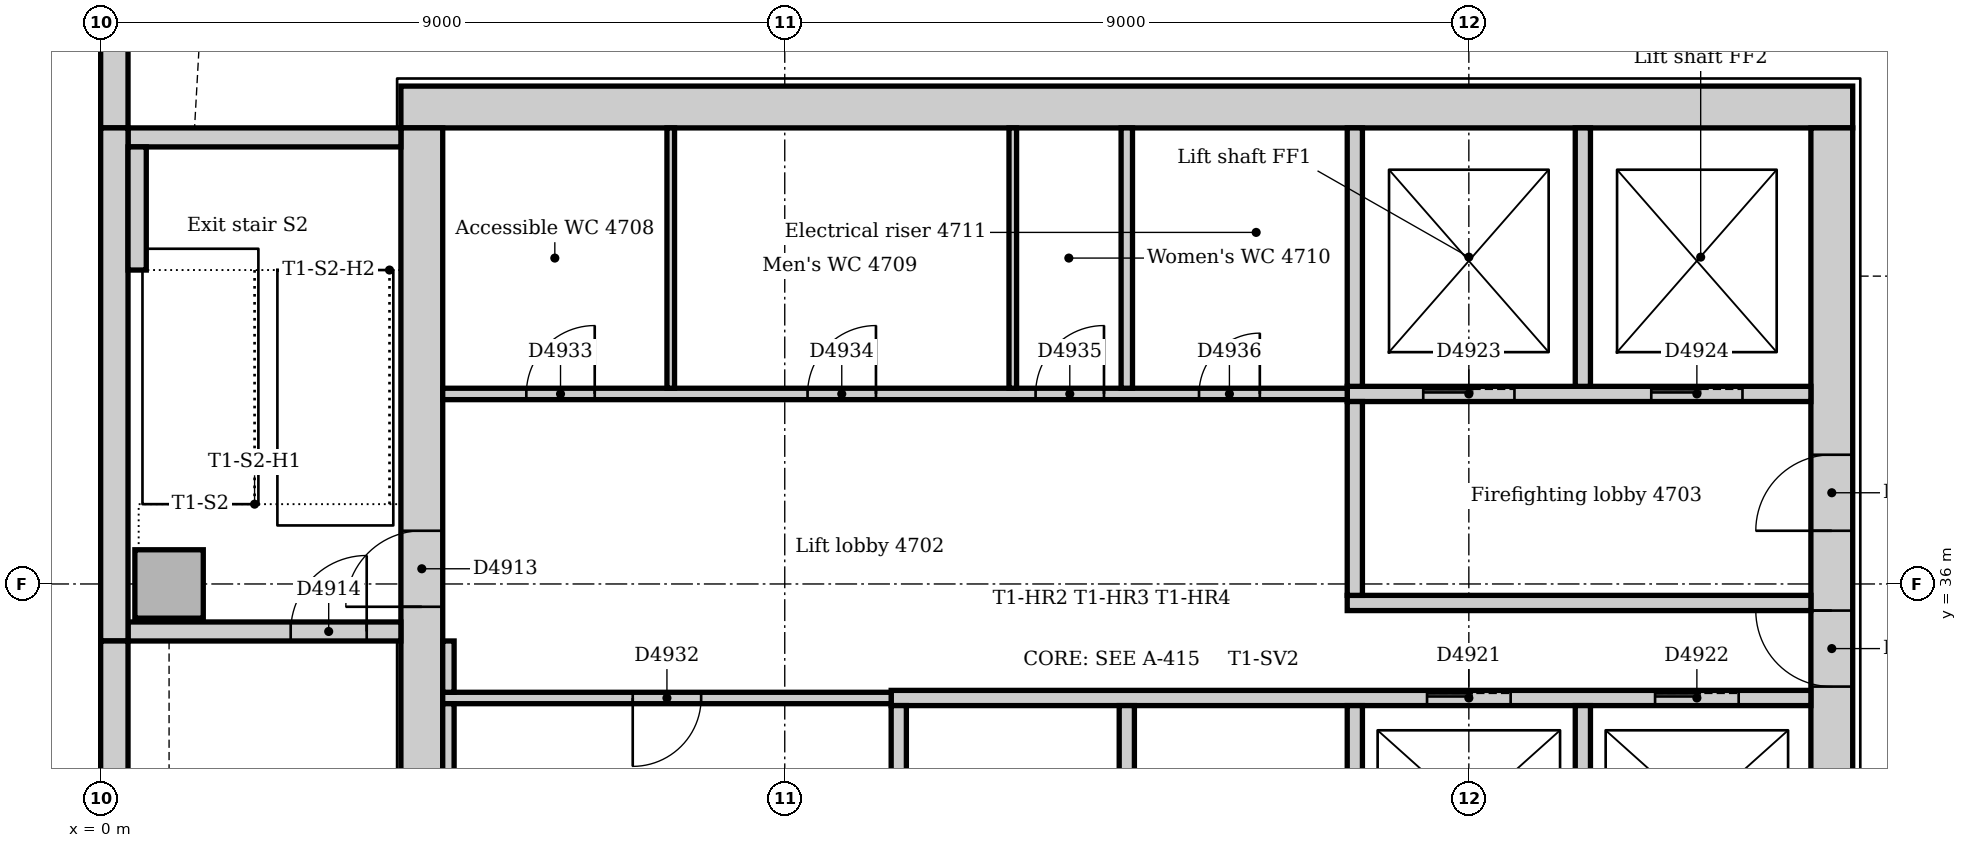
"""IFC4 building model, lengths in metres.
Left out: names, types, materials, properties, quantities, classifications, styles, units other than length and angle.
Written with IfcOpenShell. Run it as: python <this file> out.ifc"""

import sys

from ifc_helpers import new_model, si_unit, direction, frame, frame_2d, origin, origin_2d, place, context, subcontext, project, spatial, rectangle, extrude, element, fill, save


model = new_model("IFC4")
c1 = context("Model", 3, precision=1e-05, world=origin(), true_north=direction((0.0, 1.0)))
c2 = subcontext(c1, "Body", "Model", "MODEL_VIEW")
j1 = project(units=[si_unit("LENGTHUNIT", "METRE"), si_unit("PLANEANGLEUNIT", "RADIAN")], contexts=[c1])
p1 = place(None, origin())
s1 = spatial("IfcSite", under=j1, at=p1, CompositionType="ELEMENT")
p2 = place(p1, origin())
s2 = spatial("IfcBuilding", under=s1, at=p2, CompositionType="ELEMENT")
p3 = place(p2, frame((0.0, 0.0, 198.0)))
s3 = spatial("IfcBuildingStorey", under=s2, at=p3, CompositionType="ELEMENT", Elevation=198.0)
p4 = place(p3, frame((23.05, 42.275, 0.0), z_axis=(0.0, 0.0, 1.0), x_axis=(-1.0, 0.0, 0.0)))
e1 = element("IfcWall", 1, at=p4, inside=s3, PredefinedType="SOLIDWALL", context=c2, shape_type="SweptSolid", body=[
    extrude(rectangle(XDim=19.1, YDim=0.55, at=frame_2d((9.55, 0.0))), origin(), (0.0, 0.0, 1.0), 4.0),
])
p5 = place(p3, frame((22.775, 31.5, 0.0), z_axis=(0.0, 0.0, 1.0), x_axis=(0.0, 1.0, 0.0)))
e2 = element("IfcWall", 2, at=p5, inside=s3, PredefinedType="SOLIDWALL", context=c2, shape_type="SweptSolid", body=[
    extrude(rectangle(XDim=10.5, YDim=0.55, at=frame_2d((5.25, 0.0))), origin(), (0.0, 0.0, 1.0), 4.0),
])
p6 = place(p5, frame((3.15, 0.0, 0.0)))
e3 = element("IfcOpeningElement", 3, at=p6, cuts=e2, PredefinedType="OPENING", context=c2, shape_type="SweptSolid", body=[
    extrude(rectangle(XDim=1.0, YDim=2.1, at=frame_2d((0.5, 1.05))), frame((0.0, 0.285, 0.0), z_axis=(0.0, -1.0, 0.0), x_axis=(1.0, 0.0, 0.0)), (0.0, 0.0, 1.0), 0.57),
])
p7 = place(p5, frame((5.2, 0.0, 0.0)))
e4 = element("IfcOpeningElement", 4, at=p7, cuts=e2, PredefinedType="OPENING", context=c2, shape_type="SweptSolid", body=[
    extrude(rectangle(XDim=1.0, YDim=2.1, at=frame_2d((0.5, 1.05))), frame((0.0, 0.285, 0.0), z_axis=(0.0, -1.0, 0.0), x_axis=(1.0, 0.0, 0.0)), (0.0, 0.0, 1.0), 0.57),
])
p8 = place(p3, frame((4.225, 42.0, 0.0), z_axis=(0.0, 0.0, 1.0), x_axis=(0.0, -1.0, 0.0)))
e5 = element("IfcWall", 5, at=p8, inside=s3, PredefinedType="SOLIDWALL", context=c2, shape_type="SweptSolid", body=[
    extrude(rectangle(XDim=10.5, YDim=0.55, at=frame_2d((5.25, 0.0))), origin(), (0.0, 0.0, 1.0), 4.0),
])
p9 = place(p8, frame((5.3, 0.0, 0.0)))
e6 = element("IfcOpeningElement", 6, at=p9, cuts=e5, PredefinedType="OPENING", context=c2, shape_type="SweptSolid", body=[
    extrude(rectangle(XDim=1.0, YDim=2.1, at=frame_2d((0.5, 1.05))), frame((0.0, 0.285, 0.0), z_axis=(0.0, -1.0, 0.0), x_axis=(1.0, 0.0, 0.0)), (0.0, 0.0, 1.0), 0.57),
])
p10 = place(p3, frame((0.36, 35.375, 0.0), z_axis=(0.0, 0.0, 1.0), x_axis=(1.0, 0.0, 0.0)))
e7 = element("IfcWall", 7, at=p10, inside=s3, PredefinedType="SOLIDWALL", context=c2, shape_type="SweptSolid", body=[
    extrude(rectangle(XDim=3.59, YDim=0.25, at=frame_2d((1.795, 0.0))), origin(), (0.0, 0.0, 1.0), 4.0),
])
p11 = place(p10, frame((2.14, 0.0, 0.0)))
e8 = element("IfcOpeningElement", 8, at=p11, cuts=e7, PredefinedType="OPENING", context=c2, shape_type="SweptSolid", body=[
    extrude(rectangle(XDim=1.0, YDim=2.1, at=frame_2d((0.5, 1.05))), frame((0.0, 0.135, 0.0), z_axis=(0.0, -1.0, 0.0), x_axis=(1.0, 0.0, 0.0)), (0.0, 0.0, 1.0), 0.27),
])
p12 = place(p3, frame((3.95, 41.875, 0.0), z_axis=(0.0, 0.0, 1.0), x_axis=(-1.0, 0.0, 0.0)))
e9 = element("IfcWall", 9, at=p12, inside=s3, PredefinedType="SOLIDWALL", context=c2, shape_type="SweptSolid", body=[
    extrude(rectangle(XDim=3.59, YDim=0.25, at=frame_2d((1.795, 0.0))), origin(), (0.0, 0.0, 1.0), 4.0),
])
p13 = place(p3, frame((0.9, 36.0, 0.0), z_axis=(0.0, 0.0, 1.0), x_axis=(1.0, 0.0, 0.0)))
e10 = element("IfcColumn", 10, at=p13, inside=s3, PredefinedType="COLUMN", context=c2, shape_type="SweptSolid", body=[
    extrude(rectangle(XDim=0.9, YDim=0.9, at=origin_2d()), origin(), (0.0, 0.0, 1.0), 4.0),
])
p14 = place(p3, frame((0.18, 54.257, 0.0), z_axis=(0.0, 0.0, 1.0), x_axis=(0.0, -1.0, 0.0)))
e11 = element("IfcWall", 11, at=p14, inside=s3, PredefinedType="STANDARD", context=c2, shape_type="SweptSolid", body=[
    extrude(rectangle(XDim=12.257, YDim=0.36, at=frame_2d((6.129, 0.0))), origin(), (0.0, 0.0, 1.0), 3.85),
])
p15 = place(p14, frame((3.107, 0.0, 0.9)))
e12 = element("IfcOpeningElement", 12, at=p15, cuts=e11, PredefinedType="OPENING", context=c2, shape_type="SweptSolid", body=[
    extrude(rectangle(XDim=3.3, YDim=1.6, at=frame_2d((1.65, 0.8))), frame((0.0, 0.19, 0.0), z_axis=(0.0, -1.0, 0.0), x_axis=(1.0, 0.0, 0.0)), (0.0, 0.0, 1.0), 0.38),
])
p16 = place(p14, frame((7.607, 0.0, 0.9)))
e13 = element("IfcOpeningElement", 13, at=p16, cuts=e11, PredefinedType="OPENING", context=c2, shape_type="SweptSolid", body=[
    extrude(rectangle(XDim=3.3, YDim=1.6, at=frame_2d((1.65, 0.8))), frame((0.0, 0.19, 0.0), z_axis=(0.0, -1.0, 0.0), x_axis=(1.0, 0.0, 0.0)), (0.0, 0.0, 1.0), 0.38),
])
p17 = place(p3, frame((0.18, 42.0, 0.0), z_axis=(0.0, 0.0, 1.0), x_axis=(0.0, -1.0, 0.0)))
e14 = element("IfcWall", 14, at=p17, inside=s3, PredefinedType="STANDARD", context=c2, shape_type="SweptSolid", body=[
    extrude(rectangle(XDim=6.75, YDim=0.36, at=frame_2d((3.375, 0.0))), origin(), (0.0, 0.0, 1.0), 3.85),
])
p18 = place(p3, frame((0.18, 35.25, 0.0), z_axis=(0.0, 0.0, 1.0), x_axis=(0.0, -1.0, 0.0)))
e15 = element("IfcWall", 15, at=p18, inside=s3, PredefinedType="STANDARD", context=c2, shape_type="SweptSolid", body=[
    extrude(rectangle(XDim=7.5, YDim=0.36, at=frame_2d((3.75, 0.0))), origin(), (0.0, 0.0, 1.0), 3.85),
])
p19 = place(p3, frame((0.48, 40.13, 0.0), z_axis=(0.0, 0.0, 1.0), x_axis=(0.0, 1.0, 0.0)))
e16 = element("IfcWall", 16, at=p19, inside=s3, PredefinedType="STANDARD", context=c2, shape_type="SweptSolid", body=[
    extrude(rectangle(XDim=1.62, YDim=0.24, at=frame_2d((0.81, 0.0))), origin(), (0.0, 0.0, 1.0), 4.0),
])
p20 = place(p3, frame((16.4, 35.75, 0.0), z_axis=(0.0, 0.0, 1.0), x_axis=(1.0, 0.0, 0.0)))
e17 = element("IfcWall", 17, at=p20, inside=s3, PredefinedType="PARTITIONING", context=c2, shape_type="SweptSolid", body=[
    extrude(rectangle(XDim=6.1, YDim=0.2, at=frame_2d((3.05, 0.0))), origin(), (0.0, 0.0, 1.0), 3.85),
])
p21 = place(p3, frame((16.4, 38.5, 0.0), z_axis=(0.0, 0.0, 1.0), x_axis=(1.0, 0.0, 0.0)))
e18 = element("IfcWall", 18, at=p21, inside=s3, PredefinedType="PARTITIONING", context=c2, shape_type="SweptSolid", body=[
    extrude(rectangle(XDim=6.1, YDim=0.2, at=frame_2d((3.05, 0.0))), origin(), (0.0, 0.0, 1.0), 3.85),
])
p22 = place(p21, frame((1.0, 0.0, 0.0)))
e19 = element("IfcOpeningElement", 19, at=p22, cuts=e18, PredefinedType="OPENING", context=c2, shape_type="SweptSolid", body=[
    extrude(rectangle(XDim=1.2, YDim=2.1, at=frame_2d((0.6, 1.05))), frame((0.0, 0.11, 0.0), z_axis=(0.0, -1.0, 0.0), x_axis=(1.0, 0.0, 0.0)), (0.0, 0.0, 1.0), 0.22),
])
p23 = place(p21, frame((4.0, 0.0, 0.0)))
e20 = element("IfcOpeningElement", 20, at=p23, cuts=e18, PredefinedType="OPENING", context=c2, shape_type="SweptSolid", body=[
    extrude(rectangle(XDim=1.2, YDim=2.1, at=frame_2d((0.6, 1.05))), frame((0.0, 0.11, 0.0), z_axis=(0.0, -1.0, 0.0), x_axis=(1.0, 0.0, 0.0)), (0.0, 0.0, 1.0), 0.22),
])
p24 = place(p3, frame((16.5, 35.85, 0.0), z_axis=(0.0, 0.0, 1.0), x_axis=(0.0, 1.0, 0.0)))
e21 = element("IfcWall", 21, at=p24, inside=s3, PredefinedType="PARTITIONING", context=c2, shape_type="SweptSolid", body=[
    extrude(rectangle(XDim=2.55, YDim=0.2, at=frame_2d((1.275, 0.0))), origin(), (0.0, 0.0, 1.0), 3.85),
])
p25 = place(p3, frame((10.4, 34.5, 0.0), z_axis=(0.0, 0.0, 1.0), x_axis=(1.0, 0.0, 0.0)))
e22 = element("IfcWall", 22, at=p25, inside=s3, PredefinedType="PARTITIONING", context=c2, shape_type="SweptSolid", body=[
    extrude(rectangle(XDim=12.1, YDim=0.2, at=frame_2d((6.05, 0.0))), origin(), (0.0, 0.0, 1.0), 3.85),
])
p26 = place(p25, frame((7.05, 0.0, 0.0)))
e23 = element("IfcOpeningElement", 23, at=p26, cuts=e22, PredefinedType="OPENING", context=c2, shape_type="SweptSolid", body=[
    extrude(rectangle(XDim=1.1, YDim=2.1, at=frame_2d((0.55, 1.05))), frame((0.0, 0.11, 0.0), z_axis=(0.0, -1.0, 0.0), x_axis=(1.0, 0.0, 0.0)), (0.0, 0.0, 1.0), 0.22),
])
p27 = place(p25, frame((10.05, 0.0, 0.0)))
e24 = element("IfcOpeningElement", 24, at=p27, cuts=e22, PredefinedType="OPENING", context=c2, shape_type="SweptSolid", body=[
    extrude(rectangle(XDim=1.1, YDim=2.1, at=frame_2d((0.55, 1.05))), frame((0.0, 0.11, 0.0), z_axis=(0.0, -1.0, 0.0), x_axis=(1.0, 0.0, 0.0)), (0.0, 0.0, 1.0), 0.22),
])
for number, where, z_axis, x_axis in (
    (25, (10.5, 31.75, 0.0), (0.0, 0.0, 1.0), (0.0, 1.0, 0.0)),
    (26, (13.5, 31.75, 0.0), (0.0, 0.0, 1.0), (0.0, 1.0, 0.0)),
    (27, (16.5, 31.75, 0.0), (0.0, 0.0, 1.0), (0.0, 1.0, 0.0)),
    (28, (19.5, 31.75, 0.0), (0.0, 0.0, 1.0), (0.0, 1.0, 0.0)),
):
    element("IfcWall", number, at=place(p3, frame(where, z_axis=z_axis, x_axis=x_axis)), inside=s3, PredefinedType="PARTITIONING", context=c2, shape_type="SweptSolid", body=[
        extrude(rectangle(XDim=2.65, YDim=0.2, at=frame_2d((1.325, 0.0))), origin(), (0.0, 0.0, 1.0), 3.85),
    ])
for number, where, z_axis, x_axis in (
    (29, (16.5, 38.6, 0.0), (0.0, 0.0, 1.0), (0.0, 1.0, 0.0)),
    (30, (19.5, 38.6, 0.0), (0.0, 0.0, 1.0), (0.0, 1.0, 0.0)),
):
    element("IfcWall", number, at=place(p3, frame(where, z_axis=z_axis, x_axis=x_axis)), inside=s3, PredefinedType="PARTITIONING", context=c2, shape_type="SweptSolid", body=[
        extrude(rectangle(XDim=3.4, YDim=0.2, at=frame_2d((1.7, 0.0))), origin(), (0.0, 0.0, 1.0), 3.85),
    ])
p28 = place(p3, frame((4.5, 38.5, 0.0), z_axis=(0.0, 0.0, 1.0), x_axis=(1.0, 0.0, 0.0)))
e31 = element("IfcWall", 31, at=p28, inside=s3, PredefinedType="PARTITIONING", context=c2, shape_type="SweptSolid", body=[
    extrude(rectangle(XDim=11.9, YDim=0.15, at=frame_2d((5.95, 0.0))), origin(), (0.0, 0.0, 1.0), 3.85),
])
p29 = place(p28, frame((1.1, 0.0, 0.0)))
e32 = element("IfcOpeningElement", 32, at=p29, cuts=e31, PredefinedType="OPENING", context=c2, shape_type="SweptSolid", body=[
    extrude(rectangle(XDim=0.9, YDim=2.1, at=frame_2d((0.45, 1.05))), frame((0.0, 0.085, 0.0), z_axis=(0.0, -1.0, 0.0), x_axis=(1.0, 0.0, 0.0)), (0.0, 0.0, 1.0), 0.17),
])
p30 = place(p28, frame((4.8, 0.0, 0.0)))
e33 = element("IfcOpeningElement", 33, at=p30, cuts=e31, PredefinedType="OPENING", context=c2, shape_type="SweptSolid", body=[
    extrude(rectangle(XDim=0.9, YDim=2.1, at=frame_2d((0.45, 1.05))), frame((0.0, 0.085, 0.0), z_axis=(0.0, -1.0, 0.0), x_axis=(1.0, 0.0, 0.0)), (0.0, 0.0, 1.0), 0.17),
])
p31 = place(p28, frame((7.8, 0.0, 0.0)))
e34 = element("IfcOpeningElement", 34, at=p31, cuts=e31, PredefinedType="OPENING", context=c2, shape_type="SweptSolid", body=[
    extrude(rectangle(XDim=0.9, YDim=2.1, at=frame_2d((0.45, 1.05))), frame((0.0, 0.085, 0.0), z_axis=(0.0, -1.0, 0.0), x_axis=(1.0, 0.0, 0.0)), (0.0, 0.0, 1.0), 0.17),
])
p32 = place(p28, frame((9.95, 0.0, 0.0)))
e35 = element("IfcOpeningElement", 35, at=p32, cuts=e31, PredefinedType="OPENING", context=c2, shape_type="SweptSolid", body=[
    extrude(rectangle(XDim=0.8, YDim=2.1, at=frame_2d((0.4, 1.05))), frame((0.0, 0.085, 0.0), z_axis=(0.0, -1.0, 0.0), x_axis=(1.0, 0.0, 0.0)), (0.0, 0.0, 1.0), 0.17),
])
p33 = place(p3, frame((4.5, 34.5, 0.0), z_axis=(0.0, 0.0, 1.0), x_axis=(1.0, 0.0, 0.0)))
e36 = element("IfcWall", 36, at=p33, inside=s3, PredefinedType="PARTITIONING", context=c2, shape_type="SweptSolid", body=[
    extrude(rectangle(XDim=5.9, YDim=0.15, at=frame_2d((2.95, 0.0))), origin(), (0.0, 0.0, 1.0), 3.85),
])
p34 = place(p33, frame((2.5, 0.0, 0.0)))
e37 = element("IfcOpeningElement", 37, at=p34, cuts=e36, PredefinedType="OPENING", context=c2, shape_type="SweptSolid", body=[
    extrude(rectangle(XDim=0.9, YDim=2.1, at=frame_2d((0.45, 1.05))), frame((0.0, 0.085, 0.0), z_axis=(0.0, -1.0, 0.0), x_axis=(1.0, 0.0, 0.0)), (0.0, 0.0, 1.0), 0.17),
])
p35 = place(p3, frame((4.575, 34.575, 0.0), z_axis=(0.0, 0.0, 1.0), x_axis=(0.0, 1.0, 0.0)))
e38 = element("IfcWall", 38, at=p35, inside=s3, PredefinedType="PARTITIONING", context=c2, shape_type="SweptSolid", body=[
    extrude(rectangle(XDim=0.675, YDim=0.15, at=frame_2d((0.338, 0.0))), origin(), (0.0, 0.0, 1.0), 3.85),
])
p36 = place(p3, frame((4.575, 31.75, 0.0), z_axis=(0.0, 0.0, 1.0), x_axis=(0.0, 1.0, 0.0)))
e39 = element("IfcWall", 39, at=p36, inside=s3, PredefinedType="PARTITIONING", context=c2, shape_type="SweptSolid", body=[
    extrude(rectangle(XDim=2.675, YDim=0.15, at=frame_2d((1.337, 0.0))), origin(), (0.0, 0.0, 1.0), 3.85),
])
p37 = place(p3, frame((13.5, 38.575, 0.0), z_axis=(0.0, 0.0, 1.0), x_axis=(0.0, 1.0, 0.0)))
e40 = element("IfcWall", 40, at=p37, inside=s3, PredefinedType="PARTITIONING", context=c2, shape_type="SweptSolid", body=[
    extrude(rectangle(XDim=3.425, YDim=0.15, at=frame_2d((1.712, 0.0))), origin(), (0.0, 0.0, 1.0), 3.85),
])
for number, where, z_axis, x_axis in (
    (41, (7.5, 38.575, 0.0), (0.0, 0.0, 1.0), (0.0, 1.0, 0.0)),
    (42, (12.0, 38.575, 0.0), (0.0, 0.0, 1.0), (0.0, 1.0, 0.0)),
):
    element("IfcWall", number, at=place(p3, frame(where, z_axis=z_axis, x_axis=x_axis)), inside=s3, PredefinedType="PARTITIONING", context=c2, shape_type="SweptSolid", body=[
        extrude(rectangle(XDim=3.425, YDim=0.1, at=frame_2d((1.712, 0.0))), origin(), (0.0, 0.0, 1.0), 3.85),
    ])
p38 = place(p9, frame((1.0, 0.0, 0.0), z_axis=(0.0, 0.0, 1.0), x_axis=(-1.0, 0.0, 0.0)))
e43 = element("IfcDoor", 43, at=p38, inside=s3, OperationType="SINGLE_SWING_LEFT", PredefinedType="DOOR", context=c2, shape_type="SweptSolid", body=[
    extrude(rectangle(XDim=1.0, YDim=2.1, at=frame_2d((0.5, 1.05))), frame((0.0, 0.025, 0.0), z_axis=(0.0, -1.0, 0.0), x_axis=(1.0, 0.0, 0.0)), (0.0, 0.0, 1.0), 0.05),
])
fill(e6, e43)
p39 = place(p11, origin())
e44 = element("IfcDoor", 44, at=p39, inside=s3, OperationType="SINGLE_SWING_RIGHT", PredefinedType="DOOR", context=c2, shape_type="SweptSolid", body=[
    extrude(rectangle(XDim=1.0, YDim=2.1, at=frame_2d((0.5, 1.05))), frame((0.0, 0.025, 0.0), z_axis=(0.0, -1.0, 0.0), x_axis=(1.0, 0.0, 0.0)), (0.0, 0.0, 1.0), 0.05),
])
fill(e8, e44)
p40 = place(p26, origin())
e45 = element("IfcDoor", 45, at=p40, inside=s3, OperationType="SLIDING_TO_LEFT", PredefinedType="DOOR", context=c2, shape_type="SweptSolid", body=[
    extrude(rectangle(XDim=1.1, YDim=2.1, at=frame_2d((0.55, 1.05))), frame((0.0, 0.025, 0.0), z_axis=(0.0, -1.0, 0.0), x_axis=(1.0, 0.0, 0.0)), (0.0, 0.0, 1.0), 0.05),
])
fill(e23, e45)
p41 = place(p27, origin())
e46 = element("IfcDoor", 46, at=p41, inside=s3, OperationType="SLIDING_TO_LEFT", PredefinedType="DOOR", context=c2, shape_type="SweptSolid", body=[
    extrude(rectangle(XDim=1.1, YDim=2.1, at=frame_2d((0.55, 1.05))), frame((0.0, 0.025, 0.0), z_axis=(0.0, -1.0, 0.0), x_axis=(1.0, 0.0, 0.0)), (0.0, 0.0, 1.0), 0.05),
])
fill(e24, e46)
p42 = place(p22, origin())
e47 = element("IfcDoor", 47, at=p42, inside=s3, OperationType="SLIDING_TO_LEFT", PredefinedType="DOOR", context=c2, shape_type="SweptSolid", body=[
    extrude(rectangle(XDim=1.2, YDim=2.1, at=frame_2d((0.6, 1.05))), frame((0.0, 0.025, 0.0), z_axis=(0.0, -1.0, 0.0), x_axis=(1.0, 0.0, 0.0)), (0.0, 0.0, 1.0), 0.05),
])
fill(e19, e47)
p43 = place(p23, origin())
e48 = element("IfcDoor", 48, at=p43, inside=s3, OperationType="SLIDING_TO_LEFT", PredefinedType="DOOR", context=c2, shape_type="SweptSolid", body=[
    extrude(rectangle(XDim=1.2, YDim=2.1, at=frame_2d((0.6, 1.05))), frame((0.0, 0.025, 0.0), z_axis=(0.0, -1.0, 0.0), x_axis=(1.0, 0.0, 0.0)), (0.0, 0.0, 1.0), 0.05),
])
fill(e20, e48)
p44 = place(p6, origin())
e49 = element("IfcDoor", 49, at=p44, inside=s3, OperationType="SINGLE_SWING_RIGHT", PredefinedType="DOOR", context=c2, shape_type="SweptSolid", body=[
    extrude(rectangle(XDim=1.0, YDim=2.1, at=frame_2d((0.5, 1.05))), frame((0.0, 0.025, 0.0), z_axis=(0.0, -1.0, 0.0), x_axis=(1.0, 0.0, 0.0)), (0.0, 0.0, 1.0), 0.05),
])
fill(e3, e49)
p45 = place(p7, origin())
e50 = element("IfcDoor", 50, at=p45, inside=s3, OperationType="SINGLE_SWING_LEFT", PredefinedType="DOOR", context=c2, shape_type="SweptSolid", body=[
    extrude(rectangle(XDim=1.0, YDim=2.1, at=frame_2d((0.5, 1.05))), frame((0.0, 0.025, 0.0), z_axis=(0.0, -1.0, 0.0), x_axis=(1.0, 0.0, 0.0)), (0.0, 0.0, 1.0), 0.05),
])
fill(e4, e50)
p46 = place(p34, frame((0.9, 0.0, 0.0), z_axis=(0.0, 0.0, 1.0), x_axis=(-1.0, 0.0, 0.0)))
e51 = element("IfcDoor", 51, at=p46, inside=s3, OperationType="SINGLE_SWING_RIGHT", PredefinedType="DOOR", context=c2, shape_type="SweptSolid", body=[
    extrude(rectangle(XDim=0.9, YDim=2.1, at=frame_2d((0.45, 1.05))), frame((0.0, 0.025, 0.0), z_axis=(0.0, -1.0, 0.0), x_axis=(1.0, 0.0, 0.0)), (0.0, 0.0, 1.0), 0.05),
])
fill(e37, e51)
p47 = place(p29, origin())
e52 = element("IfcDoor", 52, at=p47, inside=s3, OperationType="SINGLE_SWING_RIGHT", PredefinedType="DOOR", context=c2, shape_type="SweptSolid", body=[
    extrude(rectangle(XDim=0.9, YDim=2.1, at=frame_2d((0.45, 1.05))), frame((0.0, 0.025, 0.0), z_axis=(0.0, -1.0, 0.0), x_axis=(1.0, 0.0, 0.0)), (0.0, 0.0, 1.0), 0.05),
])
fill(e32, e52)
p48 = place(p30, origin())
e53 = element("IfcDoor", 53, at=p48, inside=s3, OperationType="SINGLE_SWING_RIGHT", PredefinedType="DOOR", context=c2, shape_type="SweptSolid", body=[
    extrude(rectangle(XDim=0.9, YDim=2.1, at=frame_2d((0.45, 1.05))), frame((0.0, 0.025, 0.0), z_axis=(0.0, -1.0, 0.0), x_axis=(1.0, 0.0, 0.0)), (0.0, 0.0, 1.0), 0.05),
])
fill(e33, e53)
p49 = place(p31, origin())
e54 = element("IfcDoor", 54, at=p49, inside=s3, OperationType="SINGLE_SWING_RIGHT", PredefinedType="DOOR", context=c2, shape_type="SweptSolid", body=[
    extrude(rectangle(XDim=0.9, YDim=2.1, at=frame_2d((0.45, 1.05))), frame((0.0, 0.025, 0.0), z_axis=(0.0, -1.0, 0.0), x_axis=(1.0, 0.0, 0.0)), (0.0, 0.0, 1.0), 0.05),
])
fill(e34, e54)
p50 = place(p32, origin())
e55 = element("IfcDoor", 55, at=p50, inside=s3, OperationType="SINGLE_SWING_RIGHT", PredefinedType="DOOR", context=c2, shape_type="SweptSolid", body=[
    extrude(rectangle(XDim=0.8, YDim=2.1, at=frame_2d((0.4, 1.05))), frame((0.0, 0.025, 0.0), z_axis=(0.0, -1.0, 0.0), x_axis=(1.0, 0.0, 0.0)), (0.0, 0.0, 1.0), 0.05),
])
fill(e35, e55)
save(model, sys.argv[1])
